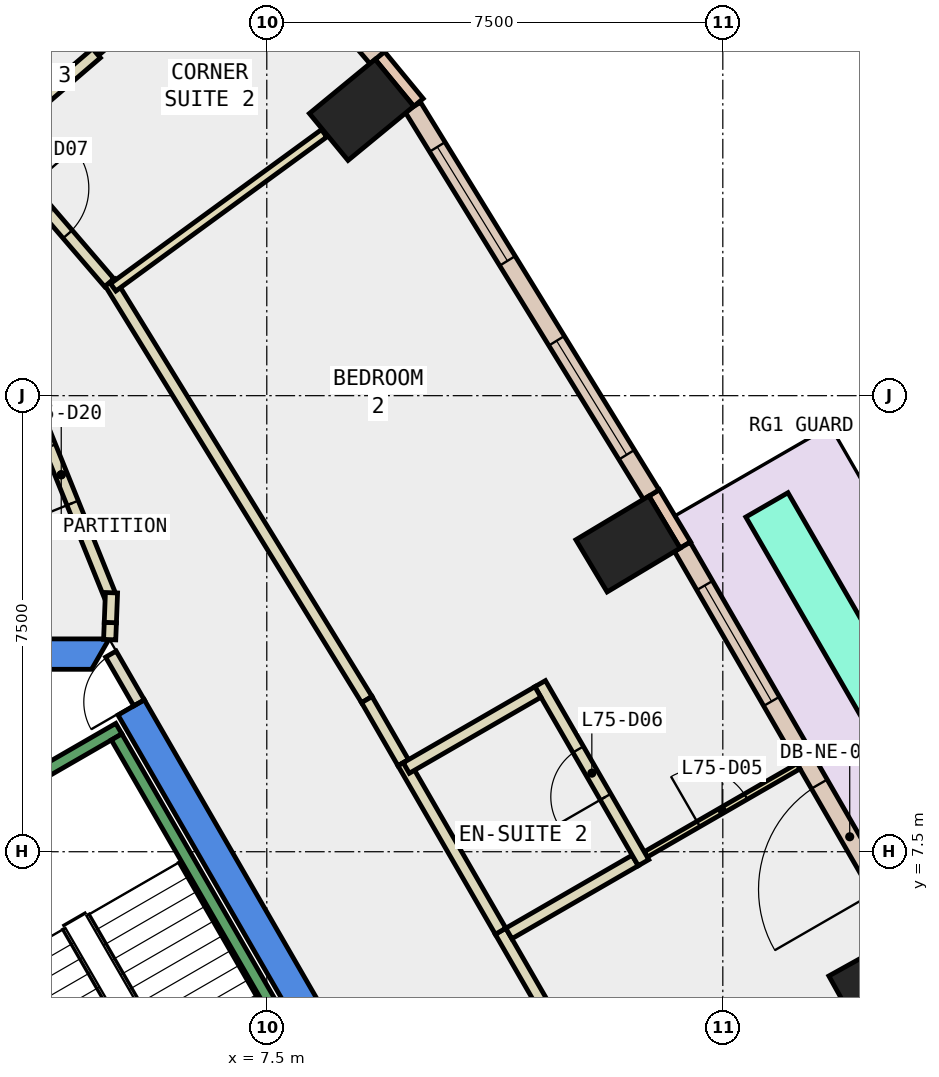
"""IFC4 building model, lengths in metres.
Left out: names, types, materials, properties, quantities, classifications, styles, units other than length and angle.
Written with IfcOpenShell. Run it as: python <this file> out.ifc"""

import sys

from ifc_helpers import new_model, si_unit, direction, frame, frame_2d, origin, origin_2d, place, context, subcontext, project, spatial, polyline, rectangle, outline, extrude, element, fill, save


model = new_model("IFC4")
c1 = context("Model", 3, precision=1e-05, world=origin(), true_north=direction((0.0, 1.0)))
c2 = subcontext(c1, "Body", "Model", "MODEL_VIEW")
j1 = project(units=[si_unit("LENGTHUNIT", "METRE"), si_unit("PLANEANGLEUNIT", "RADIAN")], contexts=[c1])
p1 = place(None, origin())
s1 = spatial("IfcSite", under=j1, at=p1, CompositionType="ELEMENT")
p2 = place(p1, origin())
s2 = spatial("IfcBuilding", under=s1, at=p2, CompositionType="ELEMENT")
p3 = place(p2, frame((0.0, 0.0, 318.8)))
s3 = spatial("IfcBuildingStorey", under=s2, at=p3, CompositionType="ELEMENT", Elevation=318.8)
for number, where, z_axis, x_axis in (
    (1, (17.599, 5.36, -0.34), (0.0, 0.0, 1.0), (-0.486, 0.874, 0.0)),
    (2, (13.441, 12.561, -0.34), (0.0, 0.0, 1.0), (-0.514, 0.858, 0.0)),
    (3, (9.059, 19.7, -0.34), (0.0, 0.0, 1.0), (-0.636, 0.772, 0.0)),
):
    element("IfcColumn", number, at=place(p3, frame(where, z_axis=z_axis, x_axis=x_axis)), inside=s3, PredefinedType="COLUMN", context=c2, shape_type="SweptSolid", body=[
        extrude(rectangle(XDim=1.0, YDim=1.4, at=origin_2d()), origin(), (0.0, 0.0, 1.0), 3.6),
    ])
p4 = place(p3, frame((0.0, 0.0, -0.34)))
e4 = element("IfcWall", 4, at=p4, inside=s3, PredefinedType="SHEAR", context=c2, shape_type="SweptSolid", body=[
    extrude(outline(polyline([(5.486, 9.998), (5.053, 9.748), (9.238, 2.5), (9.815, 2.5), (5.486, 9.998)])), origin(), (0.0, 0.0, 1.0), 3.6),
])
p5 = place(p3, frame((0.0, 0.0, -0.34)))
e5 = element("IfcWall", 5, at=p5, inside=s3, PredefinedType="SHEAR", context=c2, shape_type="SweptSolid", body=[
    extrude(outline(polyline([(4.907, 11.0), (-4.907, 11.0), (-4.619, 10.5), (4.619, 10.5), (4.907, 11.0)])), origin(), (0.0, 0.0, 1.0), 3.6),
])
for number, where, z_axis, x_axis in (
    (6, (14.384, 12.544, 0.0), (0.0, 0.0, 1.0), (-0.514, 0.858, 0.0)),
    (7, (9.995, 19.822, 0.0), (0.0, 0.0, 1.0), (-0.636, 0.772, 0.0)),
):
    element("IfcWall", number, at=place(p3, frame(where, z_axis=z_axis, x_axis=x_axis)), inside=s3, PredefinedType="STANDARD", context=c2, shape_type="SweptSolid", body=[
        extrude(rectangle(XDim=1.0, YDim=0.2, at=frame_2d((0.5, 0.0))), origin(), (0.0, 0.0, 1.0), 3.26),
    ])
p6 = place(p3, frame((18.005, 6.156, 0.0), z_axis=(0.0, 0.0, 1.0), x_axis=(-0.499958474759, 0.866049377066, 0.0)))
e8 = element("IfcWall", 8, at=p6, inside=s3, PredefinedType="STANDARD", context=c2, shape_type="SweptSolid", body=[
    extrude(rectangle(XDim=7.342, YDim=0.3, at=frame_2d((3.671, 0.0))), origin(), (0.0, 0.0, 1.0), 3.26),
])
p7 = place(p6, frame((0.836, 0.0, 0.0)))
e9 = element("IfcOpeningElement", 9, at=p7, cuts=e8, PredefinedType="OPENING", context=c2, shape_type="SweptSolid", body=[
    extrude(rectangle(XDim=2.0, YDim=2.4, at=frame_2d((1.0, 1.2))), frame((0.0, 0.16, 0.0), z_axis=(0.0, -1.0, 0.0), x_axis=(1.0, 0.0, 0.0)), (0.0, 0.0, 1.0), 0.32),
])
p8 = place(p6, frame((4.407, 0.0, 0.9)))
e10 = element("IfcOpeningElement", 10, at=p8, cuts=e8, PredefinedType="OPENING", context=c2, shape_type="SweptSolid", body=[
    extrude(rectangle(XDim=2.2, YDim=2.0, at=frame_2d((1.1, 1.0))), frame((0.0, 0.16, 0.0), z_axis=(0.0, -1.0, 0.0), x_axis=(1.0, 0.0, 0.0)), (0.0, 0.0, 1.0), 0.32),
])
p9 = place(p3, frame((13.823, 13.372, 0.0), z_axis=(0.0, 0.0, 1.0), x_axis=(-0.524004608874, 0.851715427757, 0.0)))
e11 = element("IfcWall", 11, at=p9, inside=s3, PredefinedType="STANDARD", context=c2, shape_type="SweptSolid", body=[
    extrude(rectangle(XDim=7.485, YDim=0.3, at=frame_2d((3.742, 0.0))), origin(), (0.0, 0.0, 1.0), 3.26),
])
p10 = place(p9, frame((0.771, 0.0, 0.9)))
e12 = element("IfcOpeningElement", 12, at=p10, cuts=e11, PredefinedType="OPENING", context=c2, shape_type="SweptSolid", body=[
    extrude(rectangle(XDim=2.2, YDim=2.0, at=frame_2d((1.1, 1.0))), frame((0.0, 0.16, 0.0), z_axis=(0.0, -1.0, 0.0), x_axis=(1.0, 0.0, 0.0)), (0.0, 0.0, 1.0), 0.32),
])
p11 = place(p9, frame((4.514, 0.0, 0.9)))
e13 = element("IfcOpeningElement", 13, at=p11, cuts=e11, PredefinedType="OPENING", context=c2, shape_type="SweptSolid", body=[
    extrude(rectangle(XDim=2.2, YDim=2.0, at=frame_2d((1.1, 1.0))), frame((0.0, 0.16, 0.0), z_axis=(0.0, -1.0, 0.0), x_axis=(1.0, 0.0, 0.0)), (0.0, 0.0, 1.0), 0.32),
])
p12 = place(p3, frame((9.313, 20.555, 0.0), z_axis=(0.0, 0.0, 1.0), x_axis=(-0.651684474108, 0.758490175419, 0.0)))
e14 = element("IfcWall", 14, at=p12, inside=s3, PredefinedType="STANDARD", context=c2, shape_type="SweptSolid", body=[
    extrude(rectangle(XDim=4.748, YDim=0.3, at=frame_2d((2.374, 0.0))), origin(), (0.0, 0.0, 1.0), 3.26),
])
p13 = place(p12, frame((1.674, 0.0, 0.9)))
e15 = element("IfcOpeningElement", 15, at=p13, cuts=e14, PredefinedType="OPENING", context=c2, shape_type="SweptSolid", body=[
    extrude(rectangle(XDim=1.4, YDim=2.0, at=frame_2d((0.7, 1.0))), frame((0.0, 0.16, 0.0), z_axis=(0.0, -1.0, 0.0), x_axis=(1.0, 0.0, 0.0)), (0.0, 0.0, 1.0), 0.32),
])
p14 = place(p3, frame((19.298, 7.017, 0.0), z_axis=(0.0, 0.0, 1.0), x_axis=(-0.50009711543, 0.865969326904, 0.0)))
e16 = element("IfcWall", 16, at=p14, inside=s3, PredefinedType="STANDARD", context=c2, shape_type="SweptSolid", body=[
    extrude(rectangle(XDim=7.145, YDim=0.8, at=frame_2d((3.572, 0.0))), origin(), (0.0, 0.0, 1.0), 0.8),
])
p15 = place(p3, frame((4.916, 10.988, 0.0), z_axis=(0.0, 0.0, 1.0), x_axis=(0.039066592023, 0.999236609311, 0.0)))
e17 = element("IfcWall", 17, at=p15, inside=s3, PredefinedType="PARTITIONING", context=c2, shape_type="SweptSolid", body=[
    extrude(rectangle(XDim=0.281, YDim=0.2, at=frame_2d((0.141, 0.0))), origin(), (0.0, 0.0, 1.0), 2.4),
])
p16 = place(p3, frame((4.923, 11.707, 0.0), z_axis=(0.0, 0.0, 1.0), x_axis=(-0.374122865642, 0.927379146522, 0.0)))
e18 = element("IfcWall", 18, at=p16, inside=s3, PredefinedType="PARTITIONING", context=c2, shape_type="SweptSolid", body=[
    extrude(rectangle(XDim=4.296, YDim=0.2, at=frame_2d((2.148, 0.0))), origin(), (0.0, 0.0, 1.0), 3.26),
])
p17 = place(p16, frame((1.648, 0.0, 0.0)))
e19 = element("IfcOpeningElement", 19, at=p17, cuts=e18, PredefinedType="OPENING", context=c2, shape_type="SweptSolid", body=[
    extrude(rectangle(XDim=1.0, YDim=2.1, at=frame_2d((0.5, 1.05))), frame((0.0, 0.11, 0.0), z_axis=(0.0, -1.0, 0.0), x_axis=(1.0, 0.0, 0.0)), (0.0, 0.0, 1.0), 0.22),
])
p18 = place(p3, frame((11.344, 6.193, 0.0), z_axis=(0.0, 0.0, 1.0), x_axis=(0.50004096614, -0.86600175068, 0.0)))
e20 = element("IfcWall", 20, at=p18, inside=s3, PredefinedType="PARTITIONING", context=c2, shape_type="SweptSolid", body=[
    extrude(rectangle(XDim=3.782, YDim=0.2, at=frame_2d((1.891, 0.0))), origin(), (0.0, 0.0, 1.0), 3.26),
])
p19 = place(p3, frame((4.922, 16.867, 0.0), z_axis=(0.0, 0.0, 1.0), x_axis=(0.523943621984, -0.851752945978, 0.0)))
e21 = element("IfcWall", 21, at=p19, inside=s3, PredefinedType="PARTITIONING", context=c2, shape_type="SweptSolid", body=[
    extrude(rectangle(XDim=8.06, YDim=0.2, at=frame_2d((4.03, 0.0))), origin(), (0.0, 0.0, 1.0), 3.26),
])
p20 = place(p3, frame((9.145, 10.002, 0.0), z_axis=(0.0, 0.0, 1.0), x_axis=(0.499798886082, -0.866141485827, 0.0)))
e22 = element("IfcWall", 22, at=p20, inside=s3, PredefinedType="PARTITIONING", context=c2, shape_type="SweptSolid", body=[
    extrude(rectangle(XDim=1.198, YDim=0.2, at=frame_2d((0.599, 0.0))), origin(), (0.0, 0.0, 1.0), 3.26),
])
p21 = place(p3, frame((9.744, 8.964, 0.0), z_axis=(0.0, 0.0, 1.0), x_axis=(0.500290307618, -0.865857729713, 0.0)))
e23 = element("IfcWall", 23, at=p21, inside=s3, PredefinedType="PARTITIONING", context=c2, shape_type="SweptSolid", body=[
    extrude(rectangle(XDim=3.2, YDim=0.2, at=frame_2d((1.6, 0.0))), origin(), (0.0, 0.0, 1.0), 3.26),
])
p22 = place(p3, frame((2.889, 19.209, 0.0), z_axis=(0.0, 0.0, 1.0), x_axis=(0.651686040861, -0.758488829283, 0.0)))
e24 = element("IfcWall", 24, at=p22, inside=s3, PredefinedType="PARTITIONING", context=c2, shape_type="SweptSolid", body=[
    extrude(rectangle(XDim=3.1, YDim=0.2, at=frame_2d((1.55, 0.0))), origin(), (0.0, 0.0, 1.0), 3.26),
])
p23 = place(p22, frame((1.05, 0.0, 0.0)))
e25 = element("IfcOpeningElement", 25, at=p23, cuts=e24, PredefinedType="OPENING", context=c2, shape_type="SweptSolid", body=[
    extrude(rectangle(XDim=1.0, YDim=2.1, at=frame_2d((0.5, 1.05))), frame((0.0, 0.11, 0.0), z_axis=(0.0, -1.0, 0.0), x_axis=(1.0, 0.0, 0.0)), (0.0, 0.0, 1.0), 0.22),
])
p24 = place(p3, frame((13.733, 7.456, 0.0), z_axis=(0.0, 0.0, 1.0), x_axis=(0.865990674793, 0.500060147554, 0.0)))
e26 = element("IfcWall", 26, at=p24, inside=s3, PredefinedType="PARTITIONING", context=c2, shape_type="SweptSolid", body=[
    extrude(rectangle(XDim=2.9, YDim=0.1, at=frame_2d((1.45, 0.0))), origin(), (0.0, 0.0, 1.0), 3.26),
])
p25 = place(p24, frame((1.0, 0.0, 0.0)))
e27 = element("IfcOpeningElement", 27, at=p25, cuts=e26, PredefinedType="OPENING", context=c2, shape_type="SweptSolid", body=[
    extrude(rectangle(XDim=0.9, YDim=2.1, at=frame_2d((0.45, 1.05))), frame((0.0, 0.06, 0.0), z_axis=(0.0, -1.0, 0.0), x_axis=(1.0, 0.0, 0.0)), (0.0, 0.0, 1.0), 0.12),
])
p26 = place(p3, frame((11.481, 6.156, 0.0), z_axis=(0.0, 0.0, 1.0), x_axis=(0.865999212041, 0.500045362686, 0.0)))
e28 = element("IfcWall", 28, at=p26, inside=s3, PredefinedType="PARTITIONING", context=c2, shape_type="SweptSolid", body=[
    extrude(rectangle(XDim=2.4, YDim=0.2, at=frame_2d((1.2, 0.0))), origin(), (0.0, 0.0, 1.0), 3.26),
])
p27 = place(p3, frame((13.696, 7.32, 0.0), z_axis=(0.0, 0.0, 1.0), x_axis=(-0.500070584245, 0.865984648116, 0.0)))
e29 = element("IfcWall", 29, at=p27, inside=s3, PredefinedType="PARTITIONING", context=c2, shape_type="SweptSolid", body=[
    extrude(rectangle(XDim=3.399, YDim=0.2, at=frame_2d((1.7, 0.0))), origin(), (0.0, 0.0, 1.0), 3.26),
])
p28 = place(p27, frame((1.25, 0.0, 0.0)))
e30 = element("IfcOpeningElement", 30, at=p28, cuts=e29, PredefinedType="OPENING", context=c2, shape_type="SweptSolid", body=[
    extrude(rectangle(XDim=0.9, YDim=2.1, at=frame_2d((0.45, 1.05))), frame((0.0, 0.11, 0.0), z_axis=(0.0, -1.0, 0.0), x_axis=(1.0, 0.0, 0.0)), (0.0, 0.0, 1.0), 0.22),
])
p29 = place(p3, frame((11.959, 10.127, 0.0), z_axis=(0.0, 0.0, 1.0), x_axis=(-0.866022959057, -0.500004234368, 0.0)))
e31 = element("IfcWall", 31, at=p29, inside=s3, PredefinedType="PARTITIONING", context=c2, shape_type="SweptSolid", body=[
    extrude(rectangle(XDim=2.5, YDim=0.2, at=frame_2d((1.25, 0.0))), origin(), (0.0, 0.0, 1.0), 3.26),
])
p30 = place(p3, frame((4.974, 16.782, 0.0), z_axis=(0.0, 0.0, 1.0), x_axis=(0.807621211013, 0.589701602102, 0.0)))
e32 = element("IfcWall", 32, at=p30, inside=s3, PredefinedType="PARTITIONING", context=c2, shape_type="SweptSolid", body=[
    extrude(rectangle(XDim=4.295, YDim=0.15, at=frame_2d((2.148, 0.0))), origin(), (0.0, 0.0, 1.0), 3.26),
])
p31 = place(p3, frame((4.698, 20.632, 0.0), z_axis=(0.0, 0.0, 1.0), x_axis=(0.75843091069, 0.651753445491, 0.0)))
e33 = element("IfcWall", 33, at=p31, inside=s3, PredefinedType="PARTITIONING", context=c2, shape_type="SweptSolid", body=[
    extrude(rectangle(XDim=3.3, YDim=0.1, at=frame_2d((1.65, 0.0))), origin(), (0.0, 0.0, 1.0), 3.26),
])
p32 = place(p31, frame((1.2, 0.0, 0.0)))
e34 = element("IfcOpeningElement", 34, at=p32, cuts=e33, PredefinedType="OPENING", context=c2, shape_type="SweptSolid", body=[
    extrude(rectangle(XDim=0.9, YDim=2.1, at=frame_2d((0.45, 1.05))), frame((0.0, 0.06, 0.0), z_axis=(0.0, -1.0, 0.0), x_axis=(1.0, 0.0, 0.0)), (0.0, 0.0, 1.0), 0.12),
])
p33 = place(p3, frame((2.954, 19.133, 0.0), z_axis=(0.0, 0.0, 1.0), x_axis=(0.758341579104, 0.65185738425, 0.0)))
e35 = element("IfcWall", 35, at=p33, inside=s3, PredefinedType="PARTITIONING", context=c2, shape_type="SweptSolid", body=[
    extrude(rectangle(XDim=2.3, YDim=0.2, at=frame_2d((1.15, 0.0))), origin(), (0.0, 0.0, 1.0), 3.26),
])
p34 = place(p3, frame((5.399, 9.948, 0.0), z_axis=(0.0, 0.0, 1.0), x_axis=(-0.499882215713, 0.866093395895, 0.0)))
e36 = element("IfcWall", 36, at=p34, inside=s3, PredefinedType="PARTITIONING", context=c2, shape_type="SweptSolid", body=[
    extrude(rectangle(XDim=0.926, YDim=0.2, at=frame_2d((0.463, 0.0))), origin(), (0.0, 0.0, 1.0), 2.4),
])
p35 = place(p34, frame((0.017, 0.0, 0.0)))
e37 = element("IfcOpeningElement", 37, at=p35, cuts=e36, PredefinedType="OPENING", context=c2, shape_type="SweptSolid", body=[
    extrude(rectangle(XDim=0.9, YDim=2.1, at=frame_2d((0.45, 1.05))), frame((0.0, 0.11, 0.0), z_axis=(0.0, -1.0, 0.0), x_axis=(1.0, 0.0, 0.0)), (0.0, 0.0, 1.0), 0.22),
])
p36 = place(p3, frame((4.927, 11.269, 0.0), z_axis=(0.0, 0.0, 1.0), x_axis=(0.038834659047, 0.999245650106, 0.0)))
e38 = element("IfcWall", 38, at=p36, inside=s3, PredefinedType="PARTITIONING", context=c2, shape_type="SweptSolid", body=[
    extrude(rectangle(XDim=0.49, YDim=0.2, at=frame_2d((0.245, 0.0))), origin(), (0.0, 0.0, 1.0), 3.26),
])
p37 = place(p3, frame((2.7, 8.158, 0.0), z_axis=(0.0, 0.0, 1.0), x_axis=(0.86611865017, 0.499838457731, 0.0)))
e39 = element("IfcWall", 39, at=p37, inside=s3, PredefinedType="STANDARD", context=c2, shape_type="SweptSolid", body=[
    extrude(rectangle(XDim=2.733, YDim=0.2, at=frame_2d((1.366, 0.0))), origin(), (0.0, 0.0, 1.0), 3.26),
])
p38 = place(p3, frame((4.843, 1.312, 0.0), z_axis=(0.0, 0.0, 1.0), x_axis=(-0.499963383562, 0.866046543262, 0.0)))
e40 = element("IfcWall", 40, at=p38, inside=s3, PredefinedType="STANDARD", context=c2, shape_type="SweptSolid", body=[
    extrude(rectangle(XDim=6.9, YDim=0.2, at=frame_2d((3.45, 0.0))), origin(), (0.0, 0.0, 1.0), 3.26),
])
p39 = place(p38, frame((0.45, 0.0, 0.0)))
e41 = element("IfcOpeningElement", 41, at=p39, cuts=e40, PredefinedType="OPENING", context=c2, shape_type="SweptSolid", body=[
    extrude(rectangle(XDim=1.1, YDim=2.2, at=frame_2d((0.55, 1.1))), frame((0.0, 0.11, 0.0), z_axis=(0.0, -1.0, 0.0), x_axis=(1.0, 0.0, 0.0)), (0.0, 0.0, 1.0), 0.22),
])
p40 = place(p3, frame((8.48, 3.412, 0.0), z_axis=(0.0, 0.0, 1.0), x_axis=(-0.499978703459, 0.866037698999, 0.0)))
e42 = element("IfcWall", 42, at=p40, inside=s3, PredefinedType="STANDARD", context=c2, shape_type="SweptSolid", body=[
    extrude(rectangle(XDim=6.9, YDim=0.2, at=frame_2d((3.45, 0.0))), origin(), (0.0, 0.0, 1.0), 3.26),
])
p41 = place(p7, origin())
e43 = element("IfcDoor", 43, at=p41, inside=s3, OperationType="SLIDING_TO_LEFT", PredefinedType="DOOR", context=c2, shape_type="SweptSolid", body=[
    extrude(rectangle(XDim=2.0, YDim=2.4, at=frame_2d((1.0, 1.2))), frame((0.0, 0.025, 0.0), z_axis=(0.0, -1.0, 0.0), x_axis=(1.0, 0.0, 0.0)), (0.0, 0.0, 1.0), 0.05),
])
fill(e9, e43)
p42 = place(p8, origin())
e44 = element("IfcWindow", 44, at=p42, inside=s3, PartitioningType="SINGLE_PANEL", PredefinedType="WINDOW", context=c2, shape_type="SweptSolid", body=[
    extrude(rectangle(XDim=2.2, YDim=2.0, at=frame_2d((1.1, 1.0))), frame((0.0, 0.03, 0.0), z_axis=(0.0, -1.0, 0.0), x_axis=(1.0, 0.0, 0.0)), (0.0, 0.0, 1.0), 0.06),
])
fill(e10, e44)
p43 = place(p10, origin())
e45 = element("IfcWindow", 45, at=p43, inside=s3, PartitioningType="SINGLE_PANEL", PredefinedType="WINDOW", context=c2, shape_type="SweptSolid", body=[
    extrude(rectangle(XDim=2.2, YDim=2.0, at=frame_2d((1.1, 1.0))), frame((0.0, 0.03, 0.0), z_axis=(0.0, -1.0, 0.0), x_axis=(1.0, 0.0, 0.0)), (0.0, 0.0, 1.0), 0.06),
])
fill(e12, e45)
p44 = place(p11, origin())
e46 = element("IfcWindow", 46, at=p44, inside=s3, PartitioningType="SINGLE_PANEL", PredefinedType="WINDOW", context=c2, shape_type="SweptSolid", body=[
    extrude(rectangle(XDim=2.2, YDim=2.0, at=frame_2d((1.1, 1.0))), frame((0.0, 0.03, 0.0), z_axis=(0.0, -1.0, 0.0), x_axis=(1.0, 0.0, 0.0)), (0.0, 0.0, 1.0), 0.06),
])
fill(e13, e46)
p45 = place(p25, origin())
e47 = element("IfcDoor", 47, at=p45, inside=s3, OperationType="SINGLE_SWING_LEFT", PredefinedType="DOOR", context=c2, shape_type="SweptSolid", body=[
    extrude(rectangle(XDim=0.9, YDim=2.1, at=frame_2d((0.45, 1.05))), frame((0.0, 0.025, 0.0), z_axis=(0.0, -1.0, 0.0), x_axis=(1.0, 0.0, 0.0)), (0.0, 0.0, 1.0), 0.05),
])
fill(e27, e47)
p46 = place(p28, origin())
e48 = element("IfcDoor", 48, at=p46, inside=s3, OperationType="SINGLE_SWING_LEFT", PredefinedType="DOOR", context=c2, shape_type="SweptSolid", body=[
    extrude(rectangle(XDim=0.9, YDim=2.1, at=frame_2d((0.45, 1.05))), frame((0.0, 0.025, 0.0), z_axis=(0.0, -1.0, 0.0), x_axis=(1.0, 0.0, 0.0)), (0.0, 0.0, 1.0), 0.05),
])
fill(e30, e48)
p47 = place(p23, origin())
e49 = element("IfcDoor", 49, at=p47, inside=s3, OperationType="SINGLE_SWING_LEFT", PredefinedType="DOOR", context=c2, shape_type="SweptSolid", body=[
    extrude(rectangle(XDim=1.0, YDim=2.1, at=frame_2d((0.5, 1.05))), frame((0.0, 0.025, 0.0), z_axis=(0.0, -1.0, 0.0), x_axis=(1.0, 0.0, 0.0)), (0.0, 0.0, 1.0), 0.05),
])
fill(e25, e49)
p48 = place(p17, origin())
e50 = element("IfcDoor", 50, at=p48, inside=s3, OperationType="SINGLE_SWING_LEFT", PredefinedType="DOOR", context=c2, shape_type="SweptSolid", body=[
    extrude(rectangle(XDim=1.0, YDim=2.1, at=frame_2d((0.5, 1.05))), frame((0.0, 0.025, 0.0), z_axis=(0.0, -1.0, 0.0), x_axis=(1.0, 0.0, 0.0)), (0.0, 0.0, 1.0), 0.05),
])
fill(e19, e50)
p49 = place(p35, origin())
e51 = element("IfcDoor", 51, at=p49, inside=s3, OperationType="SINGLE_SWING_LEFT", PredefinedType="DOOR", context=c2, shape_type="SweptSolid", body=[
    extrude(rectangle(XDim=0.9, YDim=2.1, at=frame_2d((0.45, 1.05))), frame((0.0, 0.025, 0.0), z_axis=(0.0, -1.0, 0.0), x_axis=(1.0, 0.0, 0.0)), (0.0, 0.0, 1.0), 0.05),
])
fill(e37, e51)
save(model, sys.argv[1])
